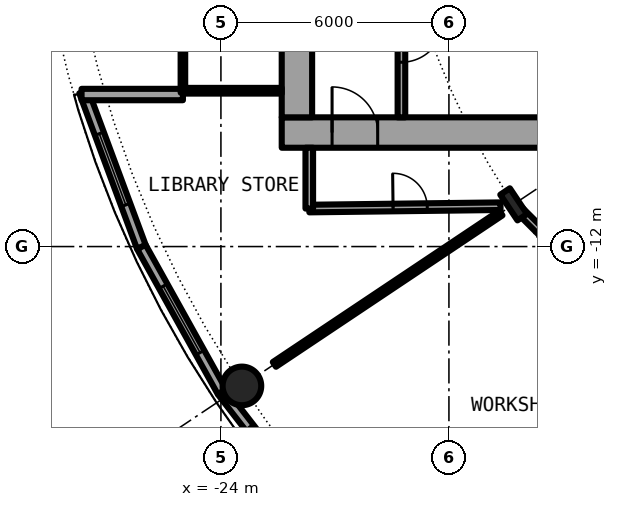
"""IFC4 building model, lengths in metres.
Left out: names, types, materials, properties, quantities, classifications, styles, units other than length and angle.
Written with IfcOpenShell. Run it as: python <this file> out.ifc"""

import sys

from ifc_helpers import new_model, si_unit, direction, frame, frame_2d, origin, origin_2d, place, context, subcontext, project, spatial, rectangle, hollow_circle, i_section, extrude, element, fill, save


model = new_model("IFC4")
c1 = context("Model", 3, precision=1e-05, world=origin(), true_north=direction((0.0, 1.0)))
c2 = subcontext(c1, "Body", "Model", "MODEL_VIEW")
j1 = project(units=[si_unit("LENGTHUNIT", "METRE"), si_unit("PLANEANGLEUNIT", "RADIAN")], contexts=[c1])
p1 = place(None, origin())
s1 = spatial("IfcSite", under=j1, at=p1, CompositionType="ELEMENT")
p2 = place(p1, origin())
s2 = spatial("IfcBuilding", under=s1, at=p2, CompositionType="ELEMENT")
p3 = place(p2, frame((0.0, 0.0, 14.1)))
s3 = spatial("IfcBuildingStorey", under=s2, at=p3, CompositionType="ELEMENT", Elevation=14.1)
p4 = place(p3, frame((-23.448, -15.667, 0.0), z_axis=(0.0, 0.0, 1.0), x_axis=(1.0, 0.0, 0.0)))
e1 = element("IfcColumn", 1, at=p4, inside=s3, PredefinedType="COLUMN", context=c2, shape_type="SweptSolid", body=[
    extrude(hollow_circle(Radius=0.508, WallThickness=0.05, at=origin_2d()), origin(), (0.0, 0.0, 1.0), 4.2),
])
p5 = place(p3, frame((-16.297, -10.889, 0.0), z_axis=(0.0, 0.0, 1.0), x_axis=(-0.831469612303, -0.55557023302, 0.0)))
e2 = element("IfcColumn", 2, at=p5, inside=s3, PredefinedType="COLUMN", context=c2, shape_type="SweptSolid", body=[
    extrude(i_section(OverallWidth=0.303, OverallDepth=0.814, WebThickness=0.021, FlangeThickness=0.04, FilletRadius=0.03, at=origin_2d()), origin(), (0.0, 0.0, 1.0), 4.2),
])
p6 = place(p3, frame((-27.61, -7.924, 0.0), z_axis=(0.0, 0.0, 1.0), x_axis=(0.348003729264, -0.937493148998, 0.0)))
e3 = element("IfcWall", 3, at=p6, inside=s3, PredefinedType="SOLIDWALL", context=c2, shape_type="SweptSolid", body=[
    extrude(rectangle(XDim=4.359, YDim=0.25, at=frame_2d((2.18, 0.0))), origin(), (0.0, 0.0, 1.0), 3.8),
])
p7 = place(p6, frame((1.18, 0.0, 0.9)))
e4 = element("IfcOpeningElement", 4, at=p7, cuts=e3, PredefinedType="OPENING", context=c2, shape_type="SweptSolid", body=[
    extrude(rectangle(XDim=2.0, YDim=2.4, at=frame_2d((1.0, 1.2))), frame((0.0, 0.135, 0.0), z_axis=(0.0, -1.0, 0.0), x_axis=(1.0, 0.0, 0.0)), (0.0, 0.0, 1.0), 0.27),
])
p8 = place(p3, frame((-26.093, -12.011, 0.0), z_axis=(0.0, 0.0, 1.0), x_axis=(0.485761785263, -0.8740912355, 0.0)))
e5 = element("IfcWall", 5, at=p8, inside=s3, PredefinedType="SOLIDWALL", context=c2, shape_type="SweptSolid", body=[
    extrude(rectangle(XDim=4.36, YDim=0.25, at=frame_2d((2.18, 0.0))), origin(), (0.0, 0.0, 1.0), 3.8),
])
p9 = place(p8, frame((1.18, 0.0, 0.9)))
e6 = element("IfcOpeningElement", 6, at=p9, cuts=e5, PredefinedType="OPENING", context=c2, shape_type="SweptSolid", body=[
    extrude(rectangle(XDim=2.0, YDim=2.4, at=frame_2d((1.0, 1.2))), frame((0.0, 0.135, 0.0), z_axis=(0.0, -1.0, 0.0), x_axis=(1.0, 0.0, 0.0)), (0.0, 0.0, 1.0), 0.27),
])
p10 = place(p3, frame((-23.975, -15.822, 0.0), z_axis=(0.0, 0.0, 1.0), x_axis=(0.612637256412, -0.790364214812, 0.0)))
e7 = element("IfcWall", 7, at=p10, inside=s3, PredefinedType="SOLIDWALL", context=c2, shape_type="SweptSolid", body=[
    extrude(rectangle(XDim=4.36, YDim=0.25, at=frame_2d((2.18, 0.0))), origin(), (0.0, 0.0, 1.0), 3.8),
])
p11 = place(p10, frame((1.18, 0.0, 0.9)))
e8 = element("IfcOpeningElement", 8, at=p11, cuts=e7, PredefinedType="OPENING", context=c2, shape_type="SweptSolid", body=[
    extrude(rectangle(XDim=2.0, YDim=2.4, at=frame_2d((1.0, 1.2))), frame((0.0, 0.135, 0.0), z_axis=(0.0, -1.0, 0.0), x_axis=(1.0, 0.0, 0.0)), (0.0, 0.0, 1.0), 0.27),
])
p12 = place(p3, frame((-25.0, -8.0, 0.0), z_axis=(0.0, 0.0, 1.0), x_axis=(-1.0, 0.0, 0.0)))
e9 = element("IfcWall", 9, at=p12, inside=s3, PredefinedType="SOLIDWALL", context=c2, shape_type="SweptSolid", body=[
    extrude(rectangle(XDim=2.667, YDim=0.3, at=frame_2d((1.333, 0.0))), origin(), (0.0, 0.0, 1.0), 3.8),
])
p13 = place(p3, frame((-22.4, -9.0, 0.0), z_axis=(0.0, 0.0, 1.0), x_axis=(1.0, 0.0, 0.0)))
e10 = element("IfcWall", 10, at=p13, inside=s3, PredefinedType="SHEAR", context=c2, shape_type="SweptSolid", body=[
    extrude(rectangle(XDim=14.2, YDim=0.8, at=frame_2d((7.1, 0.0))), origin(), (0.0, 0.0, 1.0), 4.2),
])
p14 = place(p13, frame((1.325, 0.0, 0.0)))
e11 = element("IfcOpeningElement", 11, at=p14, cuts=e10, PredefinedType="OPENING", context=c2, shape_type="SweptSolid", body=[
    extrude(rectangle(XDim=1.2, YDim=2.3, at=frame_2d((0.6, 1.15))), frame((0.0, 0.41, 0.0), z_axis=(0.0, -1.0, 0.0), x_axis=(1.0, 0.0, 0.0)), (0.0, 0.0, 1.0), 0.82),
])
p15 = place(p3, frame((-22.0, -8.6, 0.0), z_axis=(0.0, 0.0, 1.0), x_axis=(0.0, 1.0, 0.0)))
e12 = element("IfcWall", 12, at=p15, inside=s3, PredefinedType="SHEAR", context=c2, shape_type="SweptSolid", body=[
    extrude(rectangle(XDim=17.2, YDim=0.8, at=frame_2d((8.6, 0.0))), origin(), (0.0, 0.0, 1.0), 4.2),
])
p16 = place(p15, frame((7.7, 0.0, 0.0)))
e13 = element("IfcOpeningElement", 13, at=p16, cuts=e12, PredefinedType="OPENING", context=c2, shape_type="SweptSolid", body=[
    extrude(rectangle(XDim=1.8, YDim=2.3, at=frame_2d((0.9, 1.15))), frame((0.0, 0.41, 0.0), z_axis=(0.0, -1.0, 0.0), x_axis=(1.0, 0.0, 0.0)), (0.0, 0.0, 1.0), 0.82),
])
p17 = place(p3, frame((-19.25, -1.575, 0.0), z_axis=(0.0, 0.0, 1.0), x_axis=(0.0, -1.0, 0.0)))
e14 = element("IfcWall", 14, at=p17, inside=s3, PredefinedType="SOLIDWALL", context=c2, shape_type="SweptSolid", body=[
    extrude(rectangle(XDim=7.025, YDim=0.2, at=frame_2d((3.513, 0.0))), origin(), (0.0, 0.0, 1.0), 3.8),
])
p18 = place(p17, frame((4.475, 0.0, 0.0)))
e15 = element("IfcOpeningElement", 15, at=p18, cuts=e14, PredefinedType="OPENING", context=c2, shape_type="SweptSolid", body=[
    extrude(rectangle(XDim=1.1, YDim=2.3, at=frame_2d((0.55, 1.15))), frame((0.0, 0.11, 0.0), z_axis=(0.0, -1.0, 0.0), x_axis=(1.0, 0.0, 0.0)), (0.0, 0.0, 1.0), 0.22),
])
p19 = place(p3, frame((-22.4, -7.9, 0.0), z_axis=(0.0, 0.0, 1.0), x_axis=(-1.0, 0.0, 0.0)))
e16 = element("IfcWall", 16, at=p19, inside=s3, PredefinedType="PARTITIONING", context=c2, shape_type="SweptSolid", body=[
    extrude(rectangle(XDim=2.54, YDim=0.15, at=frame_2d((1.27, 0.0))), origin(), (0.0, 0.0, 1.0), 3.8),
])
p20 = place(p3, frame((-25.0, 7.95, 0.0), z_axis=(0.0, 0.0, 1.0), x_axis=(0.0, -1.0, 0.0)))
e17 = element("IfcWall", 17, at=p20, inside=s3, PredefinedType="PARTITIONING", context=c2, shape_type="SweptSolid", body=[
    extrude(rectangle(XDim=15.9, YDim=0.12, at=frame_2d((7.95, 0.0))), origin(), (0.0, 0.0, 1.0), 3.8),
])
p21 = place(p20, frame((0.95, 0.0, 0.1)))
e18 = element("IfcOpeningElement", 18, at=p21, cuts=e17, PredefinedType="OPENING", context=c2, shape_type="SweptSolid", body=[
    extrude(rectangle(XDim=14.0, YDim=3.45, at=frame_2d((7.0, 1.725))), frame((0.0, 0.07, 0.0), z_axis=(0.0, -1.0, 0.0), x_axis=(1.0, 0.0, 0.0)), (0.0, 0.0, 1.0), 0.14),
])
p22 = place(p3, frame((-16.188, -10.998, 0.0), z_axis=(0.0, 0.0, 1.0), x_axis=(0.707106781187, -0.707106781187, 0.0)))
e19 = element("IfcWall", 19, at=p22, inside=s3, PredefinedType="PARTITIONING", context=c2, shape_type="SweptSolid", body=[
    extrude(rectangle(XDim=7.34, YDim=0.2, at=frame_2d((3.67, 0.0))), origin(), (0.0, 0.0, 1.0), 3.38),
])
p23 = place(p22, frame((3.17, 0.0, 0.0)))
e20 = element("IfcOpeningElement", 20, at=p23, cuts=e19, PredefinedType="OPENING", context=c2, shape_type="SweptSolid", body=[
    extrude(rectangle(XDim=1.0, YDim=2.3, at=frame_2d((0.5, 1.15))), frame((0.0, 0.11, 0.0), z_axis=(0.0, -1.0, 0.0), x_axis=(1.0, 0.0, 0.0)), (0.0, 0.0, 1.0), 0.22),
])
p24 = place(p3, frame((-21.675, -11.0, 0.0), z_axis=(0.0, 0.0, 1.0), x_axis=(0.999924074118, 0.012322580895, 0.0)))
e21 = element("IfcWall", 21, at=p24, inside=s3, PredefinedType="PARTITIONING", context=c2, shape_type="SweptSolid", body=[
    extrude(rectangle(XDim=5.032, YDim=0.2, at=frame_2d((2.516, 0.0))), origin(), (0.0, 0.0, 1.0), 3.8),
])
p25 = place(p24, frame((2.205, 0.0, 0.0)))
e22 = element("IfcOpeningElement", 22, at=p25, cuts=e21, PredefinedType="OPENING", context=c2, shape_type="SweptSolid", body=[
    extrude(rectangle(XDim=0.9, YDim=2.3, at=frame_2d((0.45, 1.15))), frame((0.0, 0.11, 0.0), z_axis=(0.0, -1.0, 0.0), x_axis=(1.0, 0.0, 0.0)), (0.0, 0.0, 1.0), 0.22),
])
p26 = place(p3, frame((-22.593, -15.101, 0.0), z_axis=(0.0, 0.0, 1.0), x_axis=(0.831415754305, 0.555650828752, 0.0)))
e23 = element("IfcWall", 23, at=p26, inside=s3, PredefinedType="PARTITIONING", context=c2, shape_type="SweptSolid", body=[
    extrude(rectangle(XDim=7.168, YDim=0.15, at=frame_2d((3.584, 0.0))), origin(), (0.0, 0.0, 1.0), 3.8),
])
p27 = place(p3, frame((-21.675, -11.0, 0.0), z_axis=(0.0, 0.0, 1.0), x_axis=(0.0, 1.0, 0.0)))
e24 = element("IfcWall", 24, at=p27, inside=s3, PredefinedType="PARTITIONING", context=c2, shape_type="SweptSolid", body=[
    extrude(rectangle(XDim=1.6, YDim=0.2, at=frame_2d((0.8, 0.0))), origin(), (0.0, 0.0, 1.0), 3.8),
])
p28 = place(p7, origin())
e25 = element("IfcWindow", 25, at=p28, inside=s3, PartitioningType="SINGLE_PANEL", PredefinedType="WINDOW", context=c2, shape_type="SweptSolid", body=[
    extrude(rectangle(XDim=2.0, YDim=2.4, at=frame_2d((1.0, 1.2))), frame((0.0, 0.03, 0.0), z_axis=(0.0, -1.0, 0.0), x_axis=(1.0, 0.0, 0.0)), (0.0, 0.0, 1.0), 0.06),
])
fill(e4, e25)
p29 = place(p9, origin())
e26 = element("IfcWindow", 26, at=p29, inside=s3, PartitioningType="SINGLE_PANEL", PredefinedType="WINDOW", context=c2, shape_type="SweptSolid", body=[
    extrude(rectangle(XDim=2.0, YDim=2.4, at=frame_2d((1.0, 1.2))), frame((0.0, 0.03, 0.0), z_axis=(0.0, -1.0, 0.0), x_axis=(1.0, 0.0, 0.0)), (0.0, 0.0, 1.0), 0.06),
])
fill(e6, e26)
p30 = place(p11, origin())
e27 = element("IfcWindow", 27, at=p30, inside=s3, PartitioningType="SINGLE_PANEL", PredefinedType="WINDOW", context=c2, shape_type="SweptSolid", body=[
    extrude(rectangle(XDim=2.0, YDim=2.4, at=frame_2d((1.0, 1.2))), frame((0.0, 0.03, 0.0), z_axis=(0.0, -1.0, 0.0), x_axis=(1.0, 0.0, 0.0)), (0.0, 0.0, 1.0), 0.06),
])
fill(e8, e27)
p31 = place(p18, origin())
e28 = element("IfcDoor", 28, at=p31, inside=s3, OperationType="SINGLE_SWING_LEFT", PredefinedType="DOOR", context=c2, shape_type="SweptSolid", body=[
    extrude(rectangle(XDim=1.1, YDim=2.3, at=frame_2d((0.55, 1.15))), frame((0.0, 0.025, 0.0), z_axis=(0.0, -1.0, 0.0), x_axis=(1.0, 0.0, 0.0)), (0.0, 0.0, 1.0), 0.05),
])
fill(e15, e28)
p32 = place(p14, origin())
e29 = element("IfcDoor", 29, at=p32, inside=s3, OperationType="SINGLE_SWING_RIGHT", PredefinedType="DOOR", context=c2, shape_type="SweptSolid", body=[
    extrude(rectangle(XDim=1.2, YDim=2.3, at=frame_2d((0.6, 1.15))), frame((0.0, 0.025, 0.0), z_axis=(0.0, -1.0, 0.0), x_axis=(1.0, 0.0, 0.0)), (0.0, 0.0, 1.0), 0.05),
])
fill(e11, e29)
p33 = place(p21, origin())
e30 = element("IfcWindow", 30, at=p33, inside=s3, PartitioningType="SINGLE_PANEL", PredefinedType="WINDOW", context=c2, shape_type="SweptSolid", body=[
    extrude(rectangle(XDim=14.0, YDim=3.45, at=frame_2d((7.0, 1.725))), frame((0.0, 0.03, 0.0), z_axis=(0.0, -1.0, 0.0), x_axis=(1.0, 0.0, 0.0)), (0.0, 0.0, 1.0), 0.06),
])
fill(e18, e30)
p34 = place(p25, origin())
e31 = element("IfcDoor", 31, at=p34, inside=s3, OperationType="SINGLE_SWING_RIGHT", PredefinedType="DOOR", context=c2, shape_type="SweptSolid", body=[
    extrude(rectangle(XDim=0.9, YDim=2.3, at=frame_2d((0.45, 1.15))), frame((0.0, 0.025, 0.0), z_axis=(0.0, -1.0, 0.0), x_axis=(1.0, 0.0, 0.0)), (0.0, 0.0, 1.0), 0.05),
])
fill(e22, e31)
save(model, sys.argv[1])
